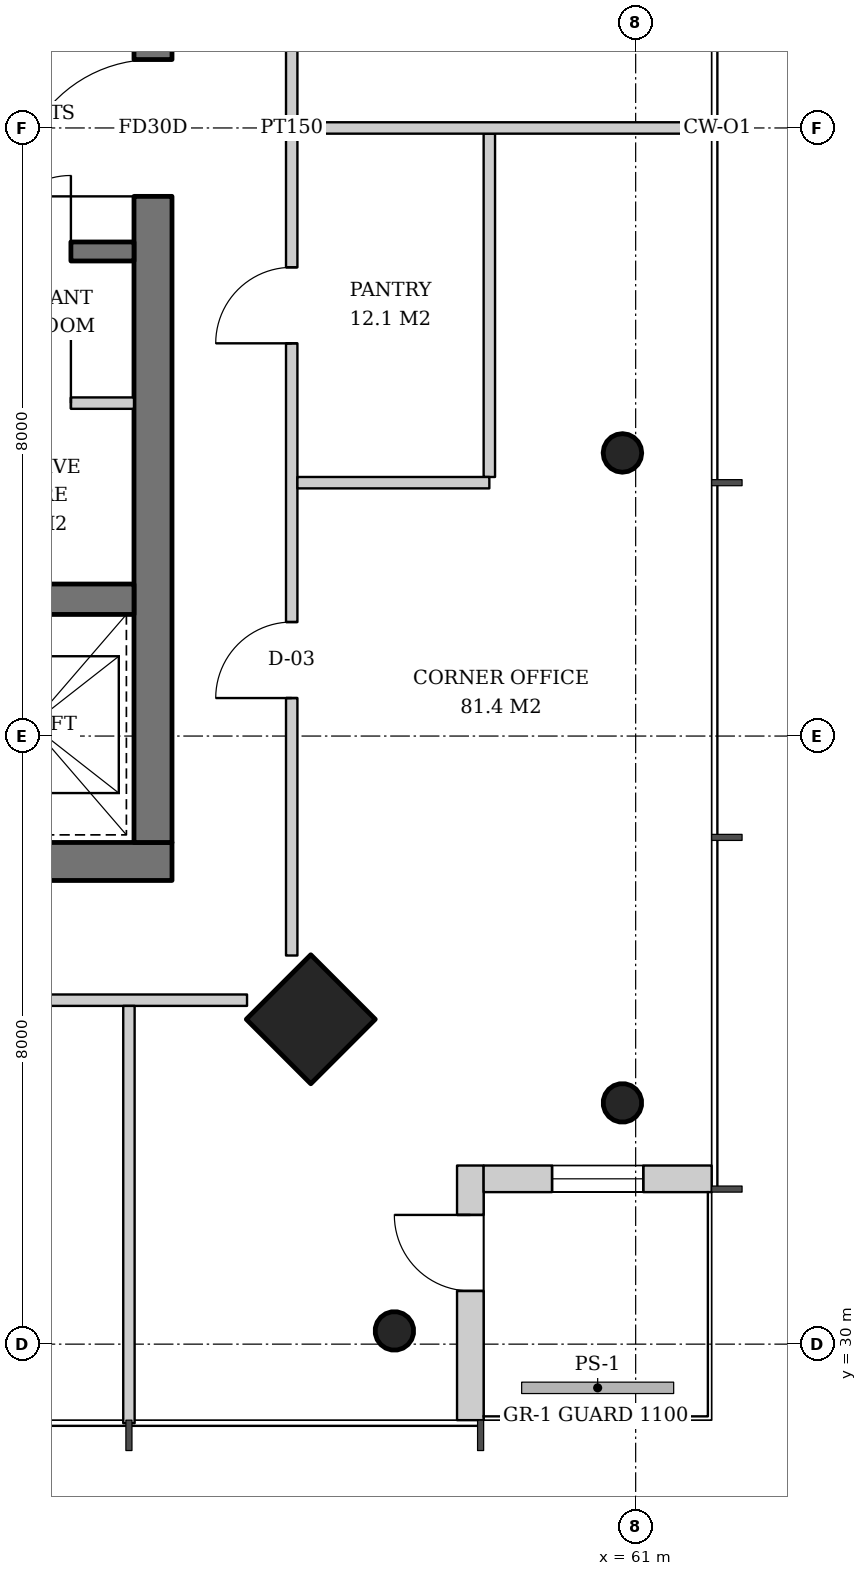
"""IFC4 building model, lengths in metres.
Left out: names, types, materials, properties, quantities, classifications, styles, units other than length and angle.
Written with IfcOpenShell. Run it as: python <this file> out.ifc"""

import sys

from ifc_helpers import new_model, si_unit, direction, frame, frame_2d, origin, origin_2d, place, context, subcontext, project, spatial, rectangle, hollow_circle, extrude, element, fill, save


model = new_model("IFC4")
c1 = context("Model", 3, precision=1e-05, world=origin(), true_north=direction((0.0, 1.0)))
c2 = subcontext(c1, "Body", "Model", "MODEL_VIEW")
j1 = project(units=[si_unit("LENGTHUNIT", "METRE"), si_unit("PLANEANGLEUNIT", "RADIAN")], contexts=[c1])
p1 = place(None, origin())
s1 = spatial("IfcSite", under=j1, at=p1, CompositionType="ELEMENT")
p2 = place(p1, origin())
s2 = spatial("IfcBuilding", under=s1, at=p2, CompositionType="ELEMENT")
p3 = place(p2, frame((0.0, 0.0, 275.6)))
s3 = spatial("IfcBuildingStorey", under=s2, at=p3, CompositionType="ELEMENT", Elevation=275.6)
p4 = place(p3, frame((60.864, 33.136, 0.0), z_axis=(-0.031900153262, 0.031900153262, 0.998981861919), x_axis=(-0.707106781187, -0.707106781187, 0.0)))
e1 = element("IfcColumn", 1, at=p4, inside=s3, PredefinedType="COLUMN", context=c2, shape_type="SweptSolid", body=[
    extrude(hollow_circle(Radius=0.254, WallThickness=0.02, at=origin_2d()), origin(), (0.0, 0.0, 1.0), 3.804),
])
p5 = place(p3, frame((60.864, 41.712, 0.0), z_axis=(-0.031914583439, 0.010659599298, 0.999433755837), x_axis=(-0.316800238982, -0.948492281772, 0.0)))
e2 = element("IfcColumn", 2, at=p5, inside=s3, PredefinedType="COLUMN", context=c2, shape_type="SweptSolid", body=[
    extrude(hollow_circle(Radius=0.254, WallThickness=0.02, at=origin_2d()), origin(), (0.0, 0.0, 1.0), 3.802),
])
p6 = place(p3, frame((56.764, 34.236, 0.0), z_axis=(-0.031964207655, 0.031964207655, 0.998977766949), x_axis=(-0.707106781187, -0.707106781187, 0.0)))
e3 = element("IfcColumn", 3, at=p6, inside=s3, PredefinedType="COLUMN", context=c2, shape_type="SweptSolid", body=[
    extrude(rectangle(XDim=1.2, YDim=1.2, at=origin_2d()), origin(), (0.0, 0.0, 1.0), 3.804),
])
p7 = place(p3, frame((57.864, 30.136, 0.0), z_axis=(-0.031900153262, 0.031900153262, 0.998981861919), x_axis=(-0.707106781187, -0.707106781187, 0.0)))
e4 = element("IfcColumn", 4, at=p7, inside=s3, PredefinedType="COLUMN", context=c2, shape_type="SweptSolid", body=[
    extrude(hollow_circle(Radius=0.254, WallThickness=0.02, at=origin_2d()), origin(), (0.0, 0.0, 1.0), 3.804),
])
p8 = place(p3, frame((35.1, 36.35, 0.0), z_axis=(0.0, 0.0, 1.0), x_axis=(1.0, 0.0, 0.0)))
e5 = element("IfcWall", 5, at=p8, inside=s3, PredefinedType="SHEAR", context=c2, shape_type="SweptSolid", body=[
    extrude(rectangle(XDim=19.8, YDim=0.5, at=frame_2d((9.9, 0.0))), origin(), (0.0, 0.0, 1.0), 3.8),
])
p9 = place(p8, frame((3.9, 0.0, 0.0)))
e6 = element("IfcOpeningElement", 6, at=p9, cuts=e5, PredefinedType="OPENING", context=c2, shape_type="SweptSolid", body=[
    extrude(rectangle(XDim=1.0, YDim=2.1, at=frame_2d((0.5, 1.05))), frame((0.0, 0.26, 0.0), z_axis=(0.0, -1.0, 0.0), x_axis=(1.0, 0.0, 0.0)), (0.0, 0.0, 1.0), 0.52),
])
p10 = place(p8, frame((15.35, 0.0, 0.0)))
e7 = element("IfcOpeningElement", 7, at=p10, cuts=e5, PredefinedType="OPENING", context=c2, shape_type="SweptSolid", body=[
    extrude(rectangle(XDim=1.0, YDim=2.1, at=frame_2d((0.5, 1.05))), frame((0.0, 0.26, 0.0), z_axis=(0.0, -1.0, 0.0), x_axis=(1.0, 0.0, 0.0)), (0.0, 0.0, 1.0), 0.52),
])
p11 = place(p3, frame((54.65, 36.6, 0.0), z_axis=(0.0, 0.0, 1.0), x_axis=(0.0, 1.0, 0.0)))
e8 = element("IfcWall", 8, at=p11, inside=s3, PredefinedType="SHEAR", context=c2, shape_type="SweptSolid", body=[
    extrude(rectangle(XDim=18.8, YDim=0.5, at=frame_2d((9.4, 0.0))), origin(), (0.0, 0.0, 1.0), 3.8),
])
p12 = place(p11, frame((8.5, 0.0, 0.0)))
e9 = element("IfcOpeningElement", 9, at=p12, cuts=e8, PredefinedType="OPENING", context=c2, shape_type="SweptSolid", body=[
    extrude(rectangle(XDim=1.8, YDim=2.4, at=frame_2d((0.9, 1.2))), frame((0.0, 0.26, 0.0), z_axis=(0.0, -1.0, 0.0), x_axis=(1.0, 0.0, 0.0)), (0.0, 0.0, 1.0), 0.52),
])
p13 = place(p3, frame((35.6, 39.8, 0.0), z_axis=(0.0, 0.0, 1.0), x_axis=(1.0, 0.0, 0.0)))
e10 = element("IfcWall", 10, at=p13, inside=s3, PredefinedType="SHEAR", context=c2, shape_type="SweptSolid", body=[
    extrude(rectangle(XDim=18.8, YDim=0.4, at=frame_2d((9.4, 0.0))), origin(), (0.0, 0.0, 1.0), 3.8),
])
p14 = place(p3, frame((58.825, 29.0, 0.0), z_axis=(0.0, 0.0, 1.0), x_axis=(0.0, 1.0, 0.0)))
e11 = element("IfcWall", 11, at=p14, inside=s3, PredefinedType="SOLIDWALL", context=c2, shape_type="SweptSolid", body=[
    extrude(rectangle(XDim=3.35, YDim=0.35, at=frame_2d((1.675, 0.0))), origin(), (0.0, 0.0, 1.0), 3.62),
])
p15 = place(p14, frame((1.7, 0.0, 0.0)))
e12 = element("IfcOpeningElement", 12, at=p15, cuts=e11, PredefinedType="OPENING", context=c2, shape_type="SweptSolid", body=[
    extrude(rectangle(XDim=1.0, YDim=2.4, at=frame_2d((0.5, 1.2))), frame((0.0, 0.185, 0.0), z_axis=(0.0, -1.0, 0.0), x_axis=(1.0, 0.0, 0.0)), (0.0, 0.0, 1.0), 0.37),
])
p16 = place(p3, frame((59.0, 32.175, 0.0), z_axis=(0.0, 0.0, 1.0), x_axis=(1.0, 0.0, 0.0)))
e13 = element("IfcWall", 13, at=p16, inside=s3, PredefinedType="SOLIDWALL", context=c2, shape_type="SweptSolid", body=[
    extrude(rectangle(XDim=3.0, YDim=0.35, at=frame_2d((1.5, 0.0))), origin(), (0.0, 0.0, 1.0), 3.62),
])
p17 = place(p16, frame((0.9, 0.0, 0.6)))
e14 = element("IfcOpeningElement", 14, at=p17, cuts=e13, PredefinedType="OPENING", context=c2, shape_type="SweptSolid", body=[
    extrude(rectangle(XDim=1.2, YDim=2.55, at=frame_2d((0.6, 1.275))), frame((0.0, 0.185, 0.0), z_axis=(0.0, -1.0, 0.0), x_axis=(1.0, 0.0, 0.0)), (0.0, 0.0, 1.0), 0.37),
])
p18 = place(p3, frame((48.93, 44.375, 0.0), z_axis=(0.0, 0.0, 1.0), x_axis=(1.0, 0.0, 0.0)))
e15 = element("IfcWall", 15, at=p18, inside=s3, PredefinedType="SHEAR", context=c2, shape_type="SweptSolid", body=[
    extrude(rectangle(XDim=5.47, YDim=0.25, at=frame_2d((2.735, 0.0))), origin(), (0.0, 0.0, 1.0), 3.8),
])
p19 = place(p18, frame((0.78, 0.0, 0.0)))
e16 = element("IfcOpeningElement", 16, at=p19, cuts=e15, PredefinedType="OPENING", context=c2, shape_type="SweptSolid", body=[
    extrude(rectangle(XDim=1.0, YDim=2.1, at=frame_2d((0.5, 1.05))), frame((0.0, 0.135, 0.0), z_axis=(0.0, -1.0, 0.0), x_axis=(1.0, 0.0, 0.0)), (0.0, 0.0, 1.0), 0.27),
])
p20 = place(p18, frame((3.64, 0.0, 0.0)))
e17 = element("IfcOpeningElement", 17, at=p20, cuts=e15, PredefinedType="OPENING", context=c2, shape_type="SweptSolid", body=[
    extrude(rectangle(XDim=1.0, YDim=2.1, at=frame_2d((0.5, 1.05))), frame((0.0, 0.135, 0.0), z_axis=(0.0, -1.0, 0.0), x_axis=(1.0, 0.0, 0.0)), (0.0, 0.0, 1.0), 0.27),
])
p21 = place(p3, frame((51.74, 42.38, 0.0), z_axis=(0.0, 0.0, 1.0), x_axis=(1.0, 0.0, 0.0)))
e18 = element("IfcWall", 18, at=p21, inside=s3, PredefinedType="SOLIDWALL", context=c2, shape_type="SweptSolid", body=[
    extrude(rectangle(XDim=2.66, YDim=0.15, at=frame_2d((1.33, 0.0))), origin(), (0.0, 0.0, 1.0), 3.62),
])
p22 = place(p21, frame((0.83, 0.0, 0.0)))
e19 = element("IfcOpeningElement", 19, at=p22, cuts=e18, PredefinedType="OPENING", context=c2, shape_type="SweptSolid", body=[
    extrude(rectangle(XDim=1.0, YDim=2.1, at=frame_2d((0.5, 1.05))), frame((0.0, 0.085, 0.0), z_axis=(0.0, -1.0, 0.0), x_axis=(1.0, 0.0, 0.0)), (0.0, 0.0, 1.0), 0.17),
])
p23 = place(p3, frame((59.075, 41.408, 0.0), z_axis=(0.0, 0.0, 1.0), x_axis=(0.0, 1.0, 0.0)))
e20 = element("IfcWall", 20, at=p23, inside=s3, PredefinedType="PARTITIONING", context=c2, shape_type="SweptSolid", body=[
    extrude(rectangle(XDim=4.517, YDim=0.15, at=frame_2d((2.258, 0.0))), origin(), (0.0, 0.0, 1.0), 2.867),
])
p24 = place(p3, frame((56.475, 35.113, 0.0), z_axis=(0.0, 0.0, 1.0), x_axis=(0.0, 1.0, 0.0)))
e21 = element("IfcWall", 21, at=p24, inside=s3, PredefinedType="PARTITIONING", context=c2, shape_type="SweptSolid", body=[
    extrude(rectangle(XDim=21.774, YDim=0.15, at=frame_2d((10.887, 0.0))), origin(), (0.0, 0.0, 1.0), 2.867),
])
p25 = place(p24, frame((3.387, 0.0, 0.0)))
e22 = element("IfcOpeningElement", 22, at=p25, cuts=e21, PredefinedType="OPENING", context=c2, shape_type="SweptSolid", body=[
    extrude(rectangle(XDim=1.0, YDim=2.1, at=frame_2d((0.5, 1.05))), frame((0.0, 0.085, 0.0), z_axis=(0.0, -1.0, 0.0), x_axis=(1.0, 0.0, 0.0)), (0.0, 0.0, 1.0), 0.17),
])
p26 = place(p24, frame((8.054, 0.0, 0.0)))
e23 = element("IfcOpeningElement", 23, at=p26, cuts=e21, PredefinedType="OPENING", context=c2, shape_type="SweptSolid", body=[
    extrude(rectangle(XDim=1.0, YDim=2.1, at=frame_2d((0.5, 1.05))), frame((0.0, 0.085, 0.0), z_axis=(0.0, -1.0, 0.0), x_axis=(1.0, 0.0, 0.0)), (0.0, 0.0, 1.0), 0.17),
])
p27 = place(p24, frame((12.72, 0.0, 0.0)))
e24 = element("IfcOpeningElement", 24, at=p27, cuts=e21, PredefinedType="OPENING", context=c2, shape_type="SweptSolid", body=[
    extrude(rectangle(XDim=1.0, YDim=2.1, at=frame_2d((0.5, 1.05))), frame((0.0, 0.085, 0.0), z_axis=(0.0, -1.0, 0.0), x_axis=(1.0, 0.0, 0.0)), (0.0, 0.0, 1.0), 0.17),
])
p28 = place(p24, frame((17.387, 0.0, 0.0)))
e25 = element("IfcOpeningElement", 25, at=p28, cuts=e21, PredefinedType="OPENING", context=c2, shape_type="SweptSolid", body=[
    extrude(rectangle(XDim=1.0, YDim=2.1, at=frame_2d((0.5, 1.05))), frame((0.0, 0.085, 0.0), z_axis=(0.0, -1.0, 0.0), x_axis=(1.0, 0.0, 0.0)), (0.0, 0.0, 1.0), 0.17),
])
p29 = place(p3, frame((56.55, 41.333, 0.0), z_axis=(0.0, 0.0, 1.0), x_axis=(1.0, 0.0, 0.0)))
e26 = element("IfcWall", 26, at=p29, inside=s3, PredefinedType="PARTITIONING", context=c2, shape_type="SweptSolid", body=[
    extrude(rectangle(XDim=2.525, YDim=0.15, at=frame_2d((1.262, 0.0))), origin(), (0.0, 0.0, 1.0), 3.62),
])
p30 = place(p3, frame((56.55, 46.0, 0.0), z_axis=(0.0, 0.0, 1.0), x_axis=(1.0, 0.0, 0.0)))
e27 = element("IfcWall", 27, at=p30, inside=s3, PredefinedType="PARTITIONING", context=c2, shape_type="SweptSolid", body=[
    extrude(rectangle(XDim=5.49, YDim=0.15, at=frame_2d((2.745, 0.0))), origin(), (0.0, 0.0, 1.0), 3.12),
])
p31 = place(p3, frame((34.113, 34.525, 0.0), z_axis=(0.0, 0.0, 1.0), x_axis=(1.0, 0.0, 0.0)))
e28 = element("IfcWall", 28, at=p31, inside=s3, PredefinedType="PARTITIONING", context=c2, shape_type="SweptSolid", body=[
    extrude(rectangle(XDim=21.774, YDim=0.15, at=frame_2d((10.887, 0.0))), origin(), (0.0, 0.0, 1.0), 2.867),
])
p32 = place(p31, frame((3.387, 0.0, 0.0)))
e29 = element("IfcOpeningElement", 29, at=p32, cuts=e28, PredefinedType="OPENING", context=c2, shape_type="SweptSolid", body=[
    extrude(rectangle(XDim=1.0, YDim=2.1, at=frame_2d((0.5, 1.05))), frame((0.0, 0.085, 0.0), z_axis=(0.0, -1.0, 0.0), x_axis=(1.0, 0.0, 0.0)), (0.0, 0.0, 1.0), 0.17),
])
p33 = place(p31, frame((8.054, 0.0, 0.0)))
e30 = element("IfcOpeningElement", 30, at=p33, cuts=e28, PredefinedType="OPENING", context=c2, shape_type="SweptSolid", body=[
    extrude(rectangle(XDim=1.0, YDim=2.1, at=frame_2d((0.5, 1.05))), frame((0.0, 0.085, 0.0), z_axis=(0.0, -1.0, 0.0), x_axis=(1.0, 0.0, 0.0)), (0.0, 0.0, 1.0), 0.17),
])
p34 = place(p31, frame((12.72, 0.0, 0.0)))
e31 = element("IfcOpeningElement", 31, at=p34, cuts=e28, PredefinedType="OPENING", context=c2, shape_type="SweptSolid", body=[
    extrude(rectangle(XDim=1.0, YDim=2.1, at=frame_2d((0.5, 1.05))), frame((0.0, 0.085, 0.0), z_axis=(0.0, -1.0, 0.0), x_axis=(1.0, 0.0, 0.0)), (0.0, 0.0, 1.0), 0.17),
])
p35 = place(p31, frame((17.387, 0.0, 0.0)))
e32 = element("IfcOpeningElement", 32, at=p35, cuts=e28, PredefinedType="OPENING", context=c2, shape_type="SweptSolid", body=[
    extrude(rectangle(XDim=1.0, YDim=2.1, at=frame_2d((0.5, 1.05))), frame((0.0, 0.085, 0.0), z_axis=(0.0, -1.0, 0.0), x_axis=(1.0, 0.0, 0.0)), (0.0, 0.0, 1.0), 0.17),
])
p36 = place(p3, frame((54.333, 34.45, 0.0), z_axis=(0.0, 0.0, 1.0), x_axis=(0.0, -1.0, 0.0)))
e33 = element("IfcWall", 33, at=p36, inside=s3, PredefinedType="PARTITIONING", context=c2, shape_type="SweptSolid", body=[
    extrude(rectangle(XDim=5.49, YDim=0.15, at=frame_2d((2.745, 0.0))), origin(), (0.0, 0.0, 1.0), 3.12),
])
p37 = place(p15, origin())
e34 = element("IfcDoor", 34, at=p37, inside=s3, OperationType="SINGLE_SWING_RIGHT", PredefinedType="DOOR", context=c2, shape_type="SweptSolid", body=[
    extrude(rectangle(XDim=1.0, YDim=2.4, at=frame_2d((0.5, 1.2))), frame((0.0, 0.025, 0.0), z_axis=(0.0, -1.0, 0.0), x_axis=(1.0, 0.0, 0.0)), (0.0, 0.0, 1.0), 0.05),
])
fill(e12, e34)
p38 = place(p17, origin())
e35 = element("IfcWindow", 35, at=p38, inside=s3, PartitioningType="SINGLE_PANEL", PredefinedType="WINDOW", context=c2, shape_type="SweptSolid", body=[
    extrude(rectangle(XDim=1.2, YDim=2.55, at=frame_2d((0.6, 1.275))), frame((0.0, 0.03, 0.0), z_axis=(0.0, -1.0, 0.0), x_axis=(1.0, 0.0, 0.0)), (0.0, 0.0, 1.0), 0.06),
])
fill(e14, e35)
p39 = place(p20, origin())
e36 = element("IfcDoor", 36, at=p39, inside=s3, OperationType="SINGLE_SWING_RIGHT", PredefinedType="DOOR", context=c2, shape_type="SweptSolid", body=[
    extrude(rectangle(XDim=1.0, YDim=2.1, at=frame_2d((0.5, 1.05))), frame((0.0, 0.025, 0.0), z_axis=(0.0, -1.0, 0.0), x_axis=(1.0, 0.0, 0.0)), (0.0, 0.0, 1.0), 0.05),
])
fill(e17, e36)
p40 = place(p22, origin())
e37 = element("IfcDoor", 37, at=p40, inside=s3, OperationType="SINGLE_SWING_RIGHT", PredefinedType="DOOR", context=c2, shape_type="SweptSolid", body=[
    extrude(rectangle(XDim=1.0, YDim=2.1, at=frame_2d((0.5, 1.05))), frame((0.0, 0.025, 0.0), z_axis=(0.0, -1.0, 0.0), x_axis=(1.0, 0.0, 0.0)), (0.0, 0.0, 1.0), 0.05),
])
fill(e19, e37)
p41 = place(p12, origin())
e38 = element("IfcDoor", 38, at=p41, inside=s3, OperationType="DOUBLE_DOOR_SINGLE_SWING", PredefinedType="DOOR", context=c2, shape_type="SweptSolid", body=[
    extrude(rectangle(XDim=1.8, YDim=2.4, at=frame_2d((0.9, 1.2))), frame((0.0, 0.025, 0.0), z_axis=(0.0, -1.0, 0.0), x_axis=(1.0, 0.0, 0.0)), (0.0, 0.0, 1.0), 0.05),
])
fill(e9, e38)
p42 = place(p25, origin())
e39 = element("IfcDoor", 39, at=p42, inside=s3, OperationType="SINGLE_SWING_LEFT", PredefinedType="DOOR", context=c2, shape_type="SweptSolid", body=[
    extrude(rectangle(XDim=1.0, YDim=2.1, at=frame_2d((0.5, 1.05))), frame((0.0, 0.025, 0.0), z_axis=(0.0, -1.0, 0.0), x_axis=(1.0, 0.0, 0.0)), (0.0, 0.0, 1.0), 0.05),
])
fill(e22, e39)
p43 = place(p26, origin())
e40 = element("IfcDoor", 40, at=p43, inside=s3, OperationType="SINGLE_SWING_LEFT", PredefinedType="DOOR", context=c2, shape_type="SweptSolid", body=[
    extrude(rectangle(XDim=1.0, YDim=2.1, at=frame_2d((0.5, 1.05))), frame((0.0, 0.025, 0.0), z_axis=(0.0, -1.0, 0.0), x_axis=(1.0, 0.0, 0.0)), (0.0, 0.0, 1.0), 0.05),
])
fill(e23, e40)
save(model, sys.argv[1])
